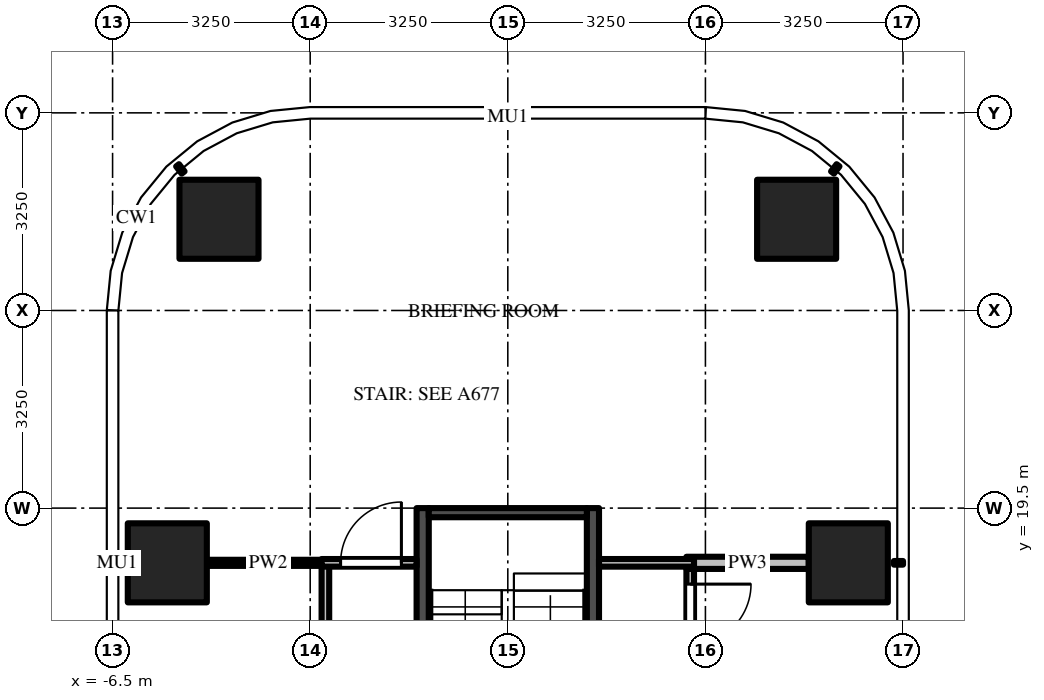
"""IFC4 building model, lengths in metres.
Left out: names, types, materials, properties, quantities, classifications, styles, units other than length and angle.
Written with IfcOpenShell. Run it as: python <this file> out.ifc"""

import sys

from ifc_helpers import new_model, si_unit, direction, frame, frame_2d, origin, origin_2d, place, context, subcontext, project, spatial, rectangle, extrude, source, transform, mapped, element, fill, save


model = new_model("IFC4")
c1 = context("Model", 3, precision=1e-05, world=origin(), true_north=direction((0.0, 1.0)))
c2 = subcontext(c1, "Body", "Model", "MODEL_VIEW")
j1 = project(units=[si_unit("LENGTHUNIT", "METRE"), si_unit("PLANEANGLEUNIT", "RADIAN")], contexts=[c1])
p1 = place(None, origin())
s1 = spatial("IfcSite", under=j1, at=p1, CompositionType="ELEMENT")
p2 = place(p1, origin())
s2 = spatial("IfcBuilding", under=s1, at=p2, CompositionType="ELEMENT")
p3 = place(p2, frame((0.0, 0.0, 106.5)))
s3 = spatial("IfcBuildingStorey", under=s2, at=p3, CompositionType="ELEMENT", Elevation=106.5)
m1 = source(origin(), c2, "Body", "SweptSolid", [
    extrude(rectangle(XDim=1.3, YDim=1.3, at=origin_2d()), origin(), (0.0, 0.0, 1.0), 4.5),
])
for number, where, z_axis, x_axis in (
    (1, (-5.6, 18.6, 0.0), (0.0, 0.0, 1.0), (1.0, 0.0, 0.0)),
    (2, (-4.75, 24.25, 0.0), (0.0, 0.0, 1.0), (1.0, 0.0, 0.0)),
    (3, (5.6, 18.6, 0.0), (0.0, 0.0, 1.0), (1.0, 0.0, 0.0)),
    (4, (4.75, 24.25, 0.0), (0.0, 0.0, 1.0), (1.0, 0.0, 0.0)),
):
    element("IfcColumn", number, at=place(p3, frame(where, z_axis=z_axis, x_axis=x_axis)), inside=s3, PredefinedType="COLUMN", context=c2, shape_type="MappedRepresentation", body=[
        mapped(m1, transform((0.0, 0.0, 0.0))),
    ])
m2 = source(origin(), c2, "Body", "SweptSolid", [
    extrude(rectangle(XDim=6.0, YDim=0.2, at=frame_2d((3.0, 0.0))), origin(), (0.0, 0.0, 1.0), 4.25),
])
for number, where, z_axis, x_axis in (
    (5, (-1.4, 13.5, 0.0), (0.0, 0.0, 1.0), (0.0, 1.0, 0.0)),
    (6, (1.4, 13.5, 0.0), (0.0, 0.0, 1.0), (0.0, 1.0, 0.0)),
):
    element("IfcWall", number, at=place(p3, frame(where, z_axis=z_axis, x_axis=x_axis)), inside=s3, PredefinedType="SHEAR", context=c2, shape_type="MappedRepresentation", body=[
        mapped(m2, transform((0.0, 0.0, 0.0))),
    ])
m3 = source(origin(), c2, "Body", "SweptSolid", [
    extrude(rectangle(XDim=2.6, YDim=0.15, at=frame_2d((1.3, 0.0))), origin(), (0.0, 0.0, 1.0), 4.25),
])
p4 = place(p3, frame((-1.3, 19.425, 0.0), z_axis=(0.0, 0.0, 1.0), x_axis=(1.0, 0.0, 0.0)))
e7 = element("IfcWall", 7, at=p4, inside=s3, PredefinedType="SHEAR", context=c2, shape_type="MappedRepresentation", body=[
    mapped(m3, transform((0.0, 0.0, 0.0))),
])
m4 = source(origin(), c2, "Body", "SweptSolid", [
    extrude(rectangle(XDim=6.387, YDim=0.125, at=frame_2d((3.194, 0.0))), origin(), (0.0, 0.0, 1.0), 3.468),
])
p5 = place(p3, frame((-3.0, 12.163, 0.0), z_axis=(0.0, 0.0, 1.0), x_axis=(0.0, 1.0, 0.0)))
e8 = element("IfcWall", 8, at=p5, inside=s3, PredefinedType="PARTITIONING", context=c2, shape_type="MappedRepresentation", body=[
    mapped(m4, transform((0.0, 0.0, 0.0))),
])
m5 = source(origin(), c2, "Body", "SweptSolid", [
    extrude(rectangle(XDim=6.3, YDim=0.125, at=frame_2d((3.15, 0.0))), origin(), (0.0, 0.0, 1.0), 3.468),
])
p6 = place(p3, frame((3.0, 18.5, 0.0), z_axis=(0.0, 0.0, 1.0), x_axis=(0.0, -1.0, 0.0)))
e9 = element("IfcWall", 9, at=p6, inside=s3, PredefinedType="PARTITIONING", context=c2, shape_type="MappedRepresentation", body=[
    mapped(m5, transform((0.0, 0.0, 0.0))),
])
m6 = source(origin(), c2, "Body", "SweptSolid", [
    extrude(rectangle(XDim=1.0, YDim=2.1, at=frame_2d((0.5, 1.05))), frame((0.0, 0.073, 0.0), z_axis=(0.0, -1.0, 0.0), x_axis=(1.0, 0.0, 0.0)), (0.0, 0.0, 1.0), 0.145),
])
p7 = place(p6, frame((0.25, 0.0, 0.0)))
e10 = element("IfcOpeningElement", 10, at=p7, cuts=e9, PredefinedType="OPENING", context=c2, shape_type="MappedRepresentation", body=[
    mapped(m6, transform((0.0, 0.0, 0.0))),
])
m7 = source(origin(), c2, "Body", "SweptSolid", [
    extrude(rectangle(XDim=2.012, YDim=0.2, at=frame_2d((1.006, 0.0))), origin(), (0.0, 0.0, 1.0), 3.697),
])
p8 = place(p3, frame((2.938, 18.6, 0.0), z_axis=(0.0, 0.0, 1.0), x_axis=(1.0, 0.0, 0.0)))
e11 = element("IfcWall", 11, at=p8, inside=s3, PredefinedType="PARTITIONING", context=c2, shape_type="MappedRepresentation", body=[
    mapped(m7, transform((0.0, 0.0, 0.0))),
])
m8 = source(origin(), c2, "Body", "SweptSolid", [
    extrude(rectangle(XDim=2.012, YDim=0.1, at=frame_2d((1.006, 0.0))), origin(), (0.0, 0.0, 1.0), 3.697),
])
p9 = place(p3, frame((-4.95, 18.6, 0.0), z_axis=(0.0, 0.0, 1.0), x_axis=(1.0, 0.0, 0.0)))
e12 = element("IfcWall", 12, at=p9, inside=s3, PredefinedType="PARTITIONING", context=c2, shape_type="MappedRepresentation", body=[
    mapped(m8, transform((0.0, 0.0, 0.0))),
])
m9 = source(origin(), c2, "Body", "SweptSolid", [
    extrude(rectangle(XDim=1.562, YDim=0.125, at=frame_2d((0.781, 0.0))), origin(), (0.0, 0.0, 1.0), 3.697),
])
p10 = place(p3, frame((-3.062, 18.6, 0.0), z_axis=(0.0, 0.0, 1.0), x_axis=(1.0, 0.0, 0.0)))
e13 = element("IfcWall", 13, at=p10, inside=s3, PredefinedType="PARTITIONING", context=c2, shape_type="MappedRepresentation", body=[
    mapped(m9, transform((0.0, 0.0, 0.0))),
])
p11 = place(p10, frame((0.312, 0.0, 0.0)))
e14 = element("IfcOpeningElement", 14, at=p11, cuts=e13, PredefinedType="OPENING", context=c2, shape_type="MappedRepresentation", body=[
    mapped(m6, transform((0.0, 0.0, 0.0))),
])
p12 = place(p3, frame((1.5, 18.6, 0.0), z_axis=(0.0, 0.0, 1.0), x_axis=(1.0, 0.0, 0.0)))
e15 = element("IfcWall", 15, at=p12, inside=s3, PredefinedType="PARTITIONING", context=c2, shape_type="MappedRepresentation", body=[
    mapped(m9, transform((0.0, 0.0, 0.0))),
])
m10 = source(origin(), c2, "Body", "SweptSolid", [
    extrude(rectangle(XDim=1.0, YDim=2.1, at=frame_2d((0.5, 1.05))), frame((0.0, 0.025, 0.0), z_axis=(0.0, -1.0, 0.0), x_axis=(1.0, 0.0, 0.0)), (0.0, 0.0, 1.0), 0.05),
])
p13 = place(p7, origin())
e16 = element("IfcDoor", 16, at=p13, inside=s3, OperationType="SINGLE_SWING_LEFT", PredefinedType="DOOR", context=c2, shape_type="MappedRepresentation", body=[
    mapped(m10, transform((0.0, 0.0, 0.0))),
])
fill(e10, e16)
p14 = place(p11, origin())
e17 = element("IfcDoor", 17, at=p14, inside=s3, OperationType="SINGLE_SWING_RIGHT", PredefinedType="DOOR", context=c2, shape_type="MappedRepresentation", body=[
    mapped(m10, transform((0.0, 0.0, 0.0))),
])
fill(e14, e17)
save(model, sys.argv[1])
